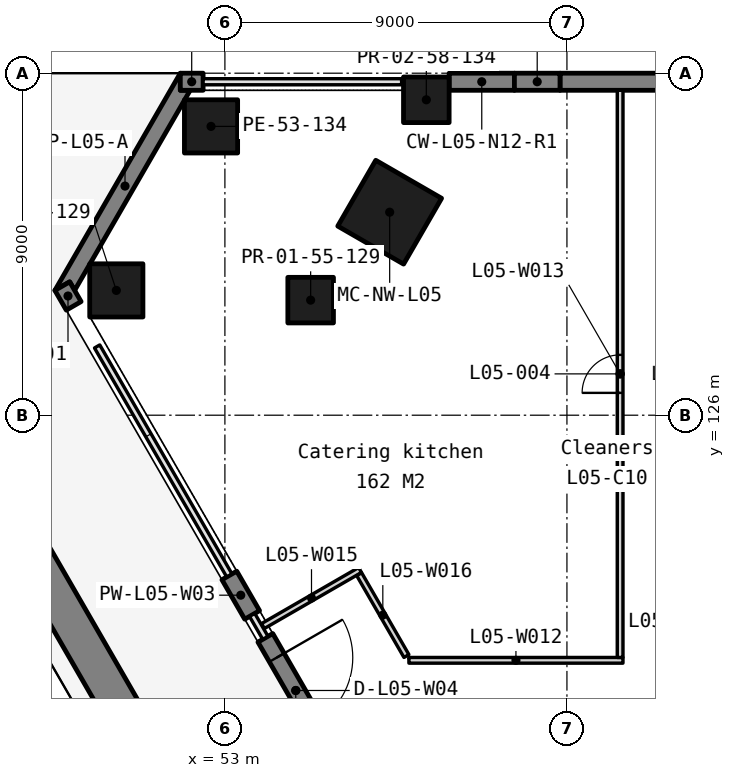
"""IFC4 building model, lengths in metres.
Left out: names, types, materials, properties, quantities, classifications, styles, units other than length and angle.
Written with IfcOpenShell. Run it as: python <this file> out.ifc"""

import sys

from ifc_helpers import new_model, si_unit, direction, frame, frame_2d, origin, origin_2d, place, context, subcontext, project, spatial, polyline, rectangle, outline, extrude, element, fill, save


model = new_model("IFC4")
c1 = context("Model", 3, precision=1e-05, world=origin(), true_north=direction((0.0, 1.0)))
c2 = subcontext(c1, "Body", "Model", "MODEL_VIEW")
j1 = project(units=[si_unit("LENGTHUNIT", "METRE"), si_unit("PLANEANGLEUNIT", "RADIAN")], contexts=[c1])
p1 = place(None, origin())
s1 = spatial("IfcSite", under=j1, at=p1, CompositionType="ELEMENT")
p2 = place(p1, origin())
s2 = spatial("IfcBuilding", under=s1, at=p2, CompositionType="ELEMENT")
p3 = place(p2, frame((0.0, 0.0, 30.0)))
s3 = spatial("IfcBuildingStorey", under=s2, at=p3, CompositionType="ELEMENT", Elevation=30.0)
for number, where, z_axis, x_axis in (
    (1, (50.143, 129.284, 0.0), (0.0, 0.0, 1.0), (1.0, 0.0, 0.0)),
    (2, (52.635, 133.6, 0.0), (0.0, 0.0, 1.0), (1.0, 0.0, 0.0)),
):
    element("IfcColumn", number, at=place(p3, frame(where, z_axis=z_axis, x_axis=x_axis)), inside=s3, PredefinedType="COLUMN", context=c2, shape_type="SweptSolid", body=[
        extrude(rectangle(XDim=1.4, YDim=1.4, at=origin_2d()), origin(), (0.0, 0.0, 1.0), 5.0),
    ])
for number, where, z_axis, x_axis in (
    (3, (55.256, 129.028, 0.0), (0.0, 0.0, 1.0), (1.0, 0.0, 0.0)),
    (4, (58.3, 134.3, 0.0), (0.0, 0.0, 1.0), (1.0, 0.0, 0.0)),
):
    element("IfcColumn", number, at=place(p3, frame(where, z_axis=z_axis, x_axis=x_axis)), inside=s3, PredefinedType="COLUMN", context=c2, shape_type="SweptSolid", body=[
        extrude(rectangle(XDim=1.2, YDim=1.2, at=origin_2d()), origin(), (0.0, 0.0, 1.0), 5.0),
    ])
p4 = place(p3, frame((57.336, 131.342, 0.0), z_axis=(0.0, 0.0, 1.0), x_axis=(-0.5, -0.866025403784, 0.0)))
e5 = element("IfcColumn", 5, at=p4, inside=s3, PredefinedType="COLUMN", context=c2, shape_type="SweptSolid", body=[
    extrude(rectangle(XDim=2.0, YDim=2.0, at=origin_2d()), origin(), (0.0, 0.0, 1.0), 5.0),
])
p5 = place(p3, frame((0.0, 0.0, -0.3)))
e6 = element("IfcWall", 6, at=p5, inside=s3, PredefinedType="SOLIDWALL", context=c2, shape_type="SweptSolid", body=[
    extrude(outline(polyline([(51.826, 135.0), (51.826, 134.55), (52.086, 134.55), (49.046, 129.284), (48.916, 129.509), (48.527, 129.284), (51.826, 135.0)])), origin(), (0.0, 0.0, 1.0), 4.413),
])
p6 = place(p3, frame((70.009, 134.775, -0.3), z_axis=(0.0, 0.0, 1.0), x_axis=(-1.0, 0.0, 0.0)))
e7 = element("IfcWall", 7, at=p6, inside=s3, PredefinedType="SOLIDWALL", context=c2, shape_type="SweptSolid", body=[
    extrude(rectangle(XDim=8.191, YDim=0.45, at=frame_2d((4.096, 0.0))), origin(), (0.0, 0.0, 1.0), 4.413),
])
p7 = place(p3, frame((61.818, 134.775, -0.3), z_axis=(0.0, 0.0, 1.0), x_axis=(-1.0, 0.0, 0.0)))
e8 = element("IfcWall", 8, at=p7, inside=s3, PredefinedType="SOLIDWALL", context=c2, shape_type="SweptSolid", body=[
    extrude(rectangle(XDim=1.2, YDim=0.45, at=frame_2d((0.6, 0.0))), origin(), (0.0, 0.0, 1.0), 4.413),
])
p8 = place(p3, frame((60.618, 134.775, -0.3), z_axis=(0.0, 0.0, 1.0), x_axis=(-1.0, 0.0, 0.0)))
e9 = element("IfcWall", 9, at=p8, inside=s3, PredefinedType="SOLIDWALL", context=c2, shape_type="SweptSolid", body=[
    extrude(rectangle(XDim=1.718, YDim=0.45, at=frame_2d((0.859, 0.0))), origin(), (0.0, 0.0, 1.0), 4.413),
])
p9 = place(p3, frame((52.427, 134.775, -0.3), z_axis=(0.0, 0.0, 1.0), x_axis=(-1.0, 0.0, 0.0)))
e10 = element("IfcWall", 10, at=p9, inside=s3, PredefinedType="SOLIDWALL", context=c2, shape_type="SweptSolid", body=[
    extrude(rectangle(XDim=0.6, YDim=0.45, at=frame_2d((0.3, 0.0))), origin(), (0.0, 0.0, 1.0), 4.413),
])
p10 = place(p3, frame((48.721, 129.397, -0.3), z_axis=(0.0, 0.0, 1.0), x_axis=(0.499816412211, -0.866131372301, 0.0)))
e11 = element("IfcWall", 11, at=p10, inside=s3, PredefinedType="SOLIDWALL", context=c2, shape_type="SweptSolid", body=[
    extrude(rectangle(XDim=0.6, YDim=0.45, at=frame_2d((0.3, 0.0))), origin(), (0.0, 0.0, 1.0), 4.413),
])
p11 = place(p3, frame((53.117, 121.783, -0.3), z_axis=(0.0, 0.0, 1.0), x_axis=(0.500033551112, -0.866006032174, 0.0)))
e12 = element("IfcWall", 12, at=p11, inside=s3, PredefinedType="SOLIDWALL", context=c2, shape_type="SweptSolid", body=[
    extrude(rectangle(XDim=1.2, YDim=0.45, at=frame_2d((0.6, 0.0))), origin(), (0.0, 0.0, 1.0), 4.413),
])
p12 = place(p3, frame((54.065, 120.142, -0.3), z_axis=(0.0, 0.0, 1.0), x_axis=(0.499995408039, -0.866028054938, 0.0)))
e13 = element("IfcWall", 13, at=p12, inside=s3, PredefinedType="SOLIDWALL", context=c2, shape_type="SweptSolid", body=[
    extrude(rectangle(XDim=3.2, YDim=0.45, at=frame_2d((1.6, 0.0))), origin(), (0.0, 0.0, 1.0), 4.413),
])
p13 = place(p12, frame((0.6, 0.0, 0.3)))
e14 = element("IfcOpeningElement", 14, at=p13, cuts=e13, PredefinedType="OPENING", context=c2, shape_type="SweptSolid", body=[
    extrude(rectangle(XDim=2.0, YDim=2.4, at=frame_2d((1.0, 1.2))), frame((0.0, 0.235, 0.0), z_axis=(0.0, -1.0, 0.0), x_axis=(1.0, 0.0, 0.0)), (0.0, 0.0, 1.0), 0.47),
])
p14 = place(p3, frame((77.166, 71.679, 0.0), z_axis=(0.0, 0.0, 1.0), x_axis=(-0.500000858155, 0.866024908328, 0.0)))
e15 = element("IfcWall", 15, at=p14, inside=s3, PredefinedType="STANDARD", context=c2, shape_type="SweptSolid", body=[
    extrude(rectangle(XDim=66.294, YDim=1.0, at=frame_2d((33.147, 0.0))), origin(), (0.0, 0.0, 1.0), 0.6),
])
p15 = place(p3, frame((57.842, 119.55, 0.0), z_axis=(0.0, 0.0, 1.0), x_axis=(1.0, 0.0, 0.0)))
e16 = element("IfcWall", 16, at=p15, inside=s3, PredefinedType="PARTITIONING", context=c2, shape_type="SweptSolid", body=[
    extrude(rectangle(XDim=5.633, YDim=0.15, at=frame_2d((2.816, 0.0))), origin(), (0.0, 0.0, 1.0), 4.8),
])
p16 = place(p3, frame((63.399, 119.625, 0.0), z_axis=(0.0, 0.0, 1.0), x_axis=(3.2715555e-05, 0.999999999465, 0.0)))
e17 = element("IfcWall", 17, at=p16, inside=s3, PredefinedType="PARTITIONING", context=c2, shape_type="SweptSolid", body=[
    extrude(rectangle(XDim=14.925, YDim=0.15, at=frame_2d((7.462, 0.0))), origin(), (0.0, 0.0, 1.0), 4.8),
])
p17 = place(p16, frame((6.962, 0.0, 0.0)))
e18 = element("IfcOpeningElement", 18, at=p17, cuts=e17, PredefinedType="OPENING", context=c2, shape_type="SweptSolid", body=[
    extrude(rectangle(XDim=1.0, YDim=2.1, at=frame_2d((0.5, 1.05))), frame((0.0, 0.085, 0.0), z_axis=(0.0, -1.0, 0.0), x_axis=(1.0, 0.0, 0.0)), (0.0, 0.0, 1.0), 0.17),
])
p18 = place(p3, frame((54.001, 120.452, 0.0), z_axis=(0.0, 0.0, 1.0), x_axis=(0.866060182126, 0.499939757307, 0.0)))
e19 = element("IfcWall", 19, at=p18, inside=s3, PredefinedType="PARTITIONING", context=c2, shape_type="SweptSolid", body=[
    extrude(rectangle(XDim=2.95, YDim=0.15, at=frame_2d((1.475, 0.0))), origin(), (0.0, 0.0, 1.0), 4.8),
])
p19 = place(p3, frame((56.534, 121.815, 0.0), z_axis=(0.0, 0.0, 1.0), x_axis=(0.500068153333, -0.865986051864, 0.0)))
e20 = element("IfcWall", 20, at=p19, inside=s3, PredefinedType="PARTITIONING", context=c2, shape_type="SweptSolid", body=[
    extrude(rectangle(XDim=2.486, YDim=0.15, at=frame_2d((1.243, 0.0))), origin(), (0.0, 0.0, 1.0), 4.8),
])
p20 = place(p13, origin())
e21 = element("IfcDoor", 21, at=p20, inside=s3, OperationType="DOUBLE_DOOR_SINGLE_SWING", PredefinedType="DOOR", context=c2, shape_type="SweptSolid", body=[
    extrude(rectangle(XDim=2.0, YDim=2.4, at=frame_2d((1.0, 1.2))), frame((0.0, 0.025, 0.0), z_axis=(0.0, -1.0, 0.0), x_axis=(1.0, 0.0, 0.0)), (0.0, 0.0, 1.0), 0.05),
])
fill(e14, e21)
p21 = place(p17, origin())
e22 = element("IfcDoor", 22, at=p21, inside=s3, OperationType="SINGLE_SWING_LEFT", PredefinedType="DOOR", context=c2, shape_type="SweptSolid", body=[
    extrude(rectangle(XDim=1.0, YDim=2.1, at=frame_2d((0.5, 1.05))), frame((0.0, 0.025, 0.0), z_axis=(0.0, -1.0, 0.0), x_axis=(1.0, 0.0, 0.0)), (0.0, 0.0, 1.0), 0.05),
])
fill(e18, e22)
save(model, sys.argv[1])
